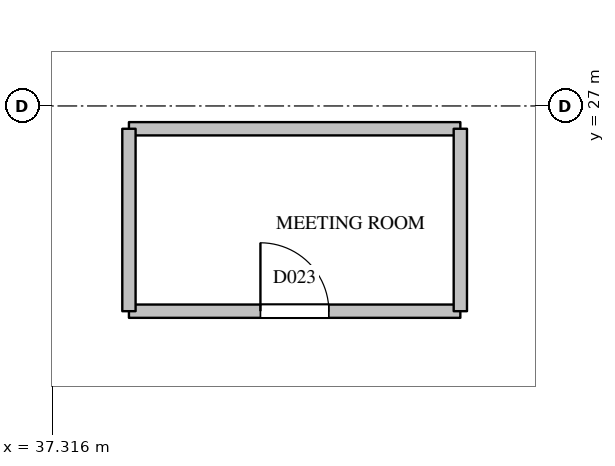
"""IFC4 building model, lengths in metres.
Left out: names, types, materials, properties, quantities, classifications, styles, units other than length and angle.
Written with IfcOpenShell. Run it as: python <this file> out.ifc"""

import sys

from ifc_helpers import new_model, si_unit, direction, frame, frame_2d, origin, place, context, subcontext, project, spatial, rectangle, extrude, element, fill, save


model = new_model("IFC4")
c1 = context("Model", 3, precision=1e-05, world=origin(), true_north=direction((0.0, 1.0)))
c2 = subcontext(c1, "Body", "Model", "MODEL_VIEW")
j1 = project(units=[si_unit("LENGTHUNIT", "METRE"), si_unit("PLANEANGLEUNIT", "RADIAN")], contexts=[c1])
p1 = place(None, origin())
s1 = spatial("IfcSite", under=j1, at=p1, CompositionType="ELEMENT")
p2 = place(p1, origin())
s2 = spatial("IfcBuilding", under=s1, at=p2, CompositionType="ELEMENT")
p3 = place(p2, frame((0.0, 0.0, 112.0)))
s3 = spatial("IfcBuildingStorey", under=s2, at=p3, CompositionType="ELEMENT", Elevation=112.0)
p4 = place(p3, frame((38.32, 24.3, 0.0), z_axis=(0.0, 0.0, 1.0), x_axis=(1.0, 0.0, 0.0)))
e1 = element("IfcWall", 1, at=p4, inside=s3, PredefinedType="PARTITIONING", context=c2, shape_type="SweptSolid", body=[
    extrude(rectangle(XDim=4.36, YDim=0.175, at=frame_2d((2.18, 0.0))), origin(), (0.0, 0.0, 1.0), 3.5),
])
p5 = place(p4, frame((1.73, 0.0, 0.0)))
e2 = element("IfcOpeningElement", 2, at=p5, cuts=e1, PredefinedType="OPENING", context=c2, shape_type="SweptSolid", body=[
    extrude(rectangle(XDim=0.9, YDim=2.1, at=frame_2d((0.45, 1.05))), frame((0.0, 0.097, 0.0), z_axis=(0.0, -1.0, 0.0), x_axis=(1.0, 0.0, 0.0)), (0.0, 0.0, 1.0), 0.195),
])
p6 = place(p3, frame((38.32, 26.7, 0.0), z_axis=(0.0, 0.0, 1.0), x_axis=(1.0, 0.0, 0.0)))
e3 = element("IfcWall", 3, at=p6, inside=s3, PredefinedType="PARTITIONING", context=c2, shape_type="SweptSolid", body=[
    extrude(rectangle(XDim=4.36, YDim=0.175, at=frame_2d((2.18, 0.0))), origin(), (0.0, 0.0, 1.0), 2.5),
])
for number, where, z_axis, x_axis in (
    (4, (38.32, 24.3, 0.0), (0.0, 0.0, 1.0), (0.0, 1.0, 0.0)),
    (5, (42.68, 24.3, 0.0), (0.0, 0.0, 1.0), (0.0, 1.0, 0.0)),
):
    element("IfcWall", number, at=place(p3, frame(where, z_axis=z_axis, x_axis=x_axis)), inside=s3, PredefinedType="PARTITIONING", context=c2, shape_type="SweptSolid", body=[
        extrude(rectangle(XDim=2.4, YDim=0.175, at=frame_2d((1.2, 0.0))), origin(), (0.0, 0.0, 1.0), 2.5),
    ])
p7 = place(p5, origin())
e6 = element("IfcDoor", 6, at=p7, inside=s3, OperationType="SINGLE_SWING_LEFT", PredefinedType="DOOR", context=c2, shape_type="SweptSolid", body=[
    extrude(rectangle(XDim=0.9, YDim=2.1, at=frame_2d((0.45, 1.05))), frame((0.0, 0.025, 0.0), z_axis=(0.0, -1.0, 0.0), x_axis=(1.0, 0.0, 0.0)), (0.0, 0.0, 1.0), 0.05),
])
fill(e2, e6)
save(model, sys.argv[1])
